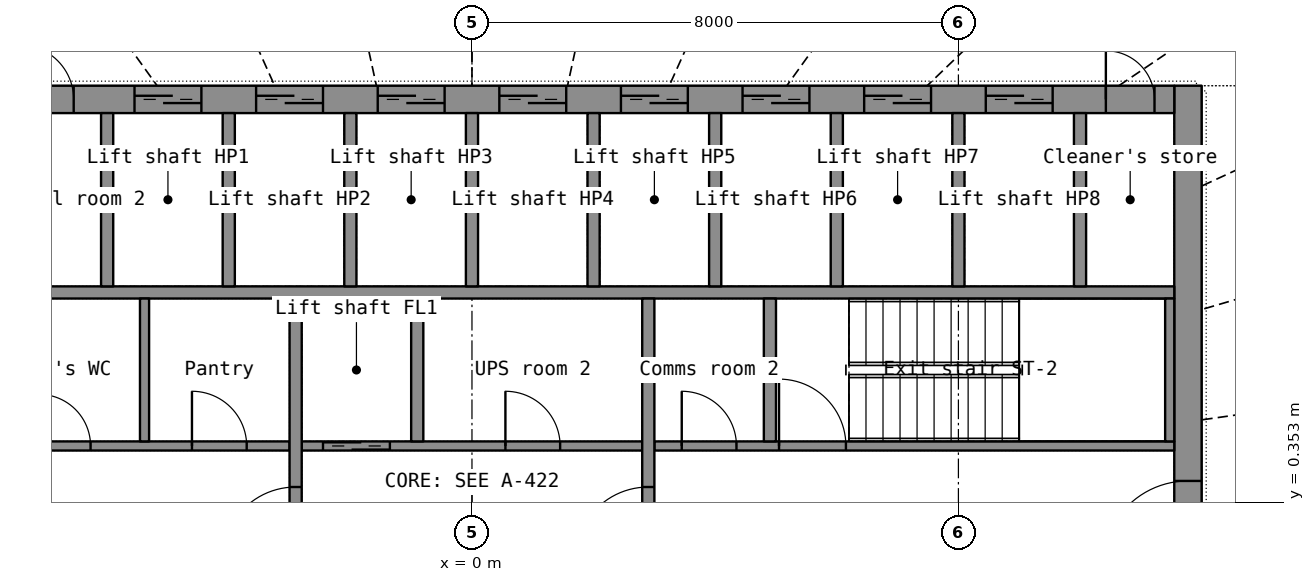
"""IFC4 building model, lengths in metres.
Left out: names, types, materials, properties, quantities, classifications, styles, units other than length and angle.
Written with IfcOpenShell. Run it as: python <this file> out.ifc"""

import sys

from ifc_helpers import new_model, si_unit, direction, frame, frame_2d, origin, place, context, subcontext, project, spatial, rectangle, extrude, element, fill, save


model = new_model("IFC4")
c1 = context("Model", 3, precision=1e-05, world=origin(), true_north=direction((0.0, 1.0)))
c2 = subcontext(c1, "Body", "Model", "MODEL_VIEW")
j1 = project(units=[si_unit("LENGTHUNIT", "METRE"), si_unit("PLANEANGLEUNIT", "RADIAN")], contexts=[c1])
p1 = place(None, origin())
s1 = spatial("IfcSite", under=j1, at=p1, CompositionType="ELEMENT")
p2 = place(p1, origin())
s2 = spatial("IfcBuilding", under=s1, at=p2, CompositionType="ELEMENT")
p3 = place(p2, frame((0.0, 0.0, 157.1)))
s3 = spatial("IfcBuildingStorey", under=s2, at=p3, CompositionType="ELEMENT", Elevation=157.1)
p4 = place(p3, frame((11.775, -7.2, 0.0), z_axis=(0.0, 0.0, 1.0), x_axis=(0.0, 1.0, 0.0)))
e1 = element("IfcWall", 1, at=p4, inside=s3, PredefinedType="SHEAR", context=c2, shape_type="SweptSolid", body=[
    extrude(rectangle(XDim=14.4, YDim=0.45, at=frame_2d((7.2, 0.0))), origin(), (0.0, 0.0, 1.0), 3.3),
])
p5 = place(p4, frame((6.5, 0.0, 0.0)))
e2 = element("IfcOpeningElement", 2, at=p5, cuts=e1, PredefinedType="OPENING", context=c2, shape_type="SweptSolid", body=[
    extrude(rectangle(XDim=1.4, YDim=2.2, at=frame_2d((0.7, 1.1))), frame((0.0, 0.235, 0.0), z_axis=(0.0, -1.0, 0.0), x_axis=(1.0, 0.0, 0.0)), (0.0, 0.0, 1.0), 0.47),
])
p6 = place(p3, frame((-11.55, 6.975, 0.0), z_axis=(0.0, 0.0, 1.0), x_axis=(1.0, 0.0, 0.0)))
e3 = element("IfcWall", 3, at=p6, inside=s3, PredefinedType="SHEAR", context=c2, shape_type="SweptSolid", body=[
    extrude(rectangle(XDim=23.1, YDim=0.45, at=frame_2d((11.55, 0.0))), origin(), (0.0, 0.0, 1.0), 3.3),
])
p7 = place(p6, frame((2.0, 0.0, 0.0)))
e4 = element("IfcOpeningElement", 4, at=p7, cuts=e3, PredefinedType="OPENING", context=c2, shape_type="SweptSolid", body=[
    extrude(rectangle(XDim=1.1, YDim=2.2, at=frame_2d((0.55, 1.1))), frame((0.0, 0.235, 0.0), z_axis=(0.0, -1.0, 0.0), x_axis=(1.0, 0.0, 0.0)), (0.0, 0.0, 1.0), 0.47),
])
p8 = place(p6, frame((6.0, 0.0, 0.0)))
e5 = element("IfcOpeningElement", 5, at=p8, cuts=e3, PredefinedType="OPENING", context=c2, shape_type="SweptSolid", body=[
    extrude(rectangle(XDim=1.1, YDim=2.2, at=frame_2d((0.55, 1.1))), frame((0.0, 0.235, 0.0), z_axis=(0.0, -1.0, 0.0), x_axis=(1.0, 0.0, 0.0)), (0.0, 0.0, 1.0), 0.47),
])
p9 = place(p6, frame((8.0, 0.0, 0.0)))
e6 = element("IfcOpeningElement", 6, at=p9, cuts=e3, PredefinedType="OPENING", context=c2, shape_type="SweptSolid", body=[
    extrude(rectangle(XDim=1.1, YDim=2.2, at=frame_2d((0.55, 1.1))), frame((0.0, 0.235, 0.0), z_axis=(0.0, -1.0, 0.0), x_axis=(1.0, 0.0, 0.0)), (0.0, 0.0, 1.0), 0.47),
])
p10 = place(p6, frame((10.0, 0.0, 0.0)))
e7 = element("IfcOpeningElement", 7, at=p10, cuts=e3, PredefinedType="OPENING", context=c2, shape_type="SweptSolid", body=[
    extrude(rectangle(XDim=1.1, YDim=2.2, at=frame_2d((0.55, 1.1))), frame((0.0, 0.235, 0.0), z_axis=(0.0, -1.0, 0.0), x_axis=(1.0, 0.0, 0.0)), (0.0, 0.0, 1.0), 0.47),
])
p11 = place(p6, frame((12.0, 0.0, 0.0)))
e8 = element("IfcOpeningElement", 8, at=p11, cuts=e3, PredefinedType="OPENING", context=c2, shape_type="SweptSolid", body=[
    extrude(rectangle(XDim=1.1, YDim=2.2, at=frame_2d((0.55, 1.1))), frame((0.0, 0.235, 0.0), z_axis=(0.0, -1.0, 0.0), x_axis=(1.0, 0.0, 0.0)), (0.0, 0.0, 1.0), 0.47),
])
p12 = place(p6, frame((14.0, 0.0, 0.0)))
e9 = element("IfcOpeningElement", 9, at=p12, cuts=e3, PredefinedType="OPENING", context=c2, shape_type="SweptSolid", body=[
    extrude(rectangle(XDim=1.1, YDim=2.2, at=frame_2d((0.55, 1.1))), frame((0.0, 0.235, 0.0), z_axis=(0.0, -1.0, 0.0), x_axis=(1.0, 0.0, 0.0)), (0.0, 0.0, 1.0), 0.47),
])
p13 = place(p6, frame((16.0, 0.0, 0.0)))
e10 = element("IfcOpeningElement", 10, at=p13, cuts=e3, PredefinedType="OPENING", context=c2, shape_type="SweptSolid", body=[
    extrude(rectangle(XDim=1.1, YDim=2.2, at=frame_2d((0.55, 1.1))), frame((0.0, 0.235, 0.0), z_axis=(0.0, -1.0, 0.0), x_axis=(1.0, 0.0, 0.0)), (0.0, 0.0, 1.0), 0.47),
])
p14 = place(p6, frame((18.0, 0.0, 0.0)))
e11 = element("IfcOpeningElement", 11, at=p14, cuts=e3, PredefinedType="OPENING", context=c2, shape_type="SweptSolid", body=[
    extrude(rectangle(XDim=1.1, YDim=2.2, at=frame_2d((0.55, 1.1))), frame((0.0, 0.235, 0.0), z_axis=(0.0, -1.0, 0.0), x_axis=(1.0, 0.0, 0.0)), (0.0, 0.0, 1.0), 0.47),
])
p15 = place(p6, frame((20.0, 0.0, 0.0)))
e12 = element("IfcOpeningElement", 12, at=p15, cuts=e3, PredefinedType="OPENING", context=c2, shape_type="SweptSolid", body=[
    extrude(rectangle(XDim=1.1, YDim=2.2, at=frame_2d((0.55, 1.1))), frame((0.0, 0.235, 0.0), z_axis=(0.0, -1.0, 0.0), x_axis=(1.0, 0.0, 0.0)), (0.0, 0.0, 1.0), 0.47),
])
p16 = place(p6, frame((4.1, 0.0, 0.0)))
e13 = element("IfcOpeningElement", 13, at=p16, cuts=e3, PredefinedType="OPENING", context=c2, shape_type="SweptSolid", body=[
    extrude(rectangle(XDim=0.9, YDim=2.1, at=frame_2d((0.45, 1.05))), frame((0.0, 0.235, 0.0), z_axis=(0.0, -1.0, 0.0), x_axis=(1.0, 0.0, 0.0)), (0.0, 0.0, 1.0), 0.47),
])
p17 = place(p6, frame((0.325, 0.0, 0.0)))
e14 = element("IfcOpeningElement", 14, at=p17, cuts=e3, PredefinedType="OPENING", context=c2, shape_type="SweptSolid", body=[
    extrude(rectangle(XDim=0.8, YDim=2.05, at=frame_2d((0.4, 1.025))), frame((0.0, 0.235, 0.0), z_axis=(0.0, -1.0, 0.0), x_axis=(1.0, 0.0, 0.0)), (0.0, 0.0, 1.0), 0.47),
])
p18 = place(p6, frame((21.975, 0.0, 0.0)))
e15 = element("IfcOpeningElement", 15, at=p18, cuts=e3, PredefinedType="OPENING", context=c2, shape_type="SweptSolid", body=[
    extrude(rectangle(XDim=0.8, YDim=2.05, at=frame_2d((0.4, 1.025))), frame((0.0, 0.235, 0.0), z_axis=(0.0, -1.0, 0.0), x_axis=(1.0, 0.0, 0.0)), (0.0, 0.0, 1.0), 0.47),
])
p19 = place(p3, frame((-11.55, 3.8, 0.0), z_axis=(0.0, 0.0, 1.0), x_axis=(1.0, 0.0, 0.0)))
e16 = element("IfcWall", 16, at=p19, inside=s3, PredefinedType="SHEAR", context=c2, shape_type="SweptSolid", body=[
    extrude(rectangle(XDim=23.1, YDim=0.2, at=frame_2d((11.55, 0.0))), origin(), (0.0, 0.0, 1.0), 3.3),
])
for number, where, z_axis, x_axis in (
    (17, (-6.0, 3.9, 0.0), (0.0, 0.0, 1.0), (0.0, 1.0, 0.0)),
    (18, (-4.0, 3.9, 0.0), (0.0, 0.0, 1.0), (0.0, 1.0, 0.0)),
    (19, (-2.0, 3.9, 0.0), (0.0, 0.0, 1.0), (0.0, 1.0, 0.0)),
    (20, (0.0, 3.9, 0.0), (0.0, 0.0, 1.0), (0.0, 1.0, 0.0)),
    (21, (2.0, 3.9, 0.0), (0.0, 0.0, 1.0), (0.0, 1.0, 0.0)),
    (22, (4.0, 3.9, 0.0), (0.0, 0.0, 1.0), (0.0, 1.0, 0.0)),
    (23, (6.0, 3.9, 0.0), (0.0, 0.0, 1.0), (0.0, 1.0, 0.0)),
    (24, (8.0, 3.9, 0.0), (0.0, 0.0, 1.0), (0.0, 1.0, 0.0)),
    (25, (10.0, 3.9, 0.0), (0.0, 0.0, 1.0), (0.0, 1.0, 0.0)),
):
    element("IfcWall", number, at=place(p3, frame(where, z_axis=z_axis, x_axis=x_axis)), inside=s3, PredefinedType="SHEAR", context=c2, shape_type="SweptSolid", body=[
        extrude(rectangle(XDim=2.85, YDim=0.2, at=frame_2d((1.425, 0.0))), origin(), (0.0, 0.0, 1.0), 3.3),
    ])
p20 = place(p3, frame((-11.55, 1.275, 0.0), z_axis=(0.0, 0.0, 1.0), x_axis=(1.0, 0.0, 0.0)))
e26 = element("IfcWall", 26, at=p20, inside=s3, PredefinedType="PARTITIONING", context=c2, shape_type="SweptSolid", body=[
    extrude(rectangle(XDim=8.55, YDim=0.15, at=frame_2d((4.275, 0.0))), origin(), (0.0, 0.0, 1.0), 3.3),
])
p21 = place(p20, frame((1.308, 0.0, 0.0)))
e27 = element("IfcOpeningElement", 27, at=p21, cuts=e26, PredefinedType="OPENING", context=c2, shape_type="SweptSolid", body=[
    extrude(rectangle(XDim=0.85, YDim=2.1, at=frame_2d((0.425, 1.05))), frame((0.0, 0.085, 0.0), z_axis=(0.0, -1.0, 0.0), x_axis=(1.0, 0.0, 0.0)), (0.0, 0.0, 1.0), 0.17),
])
p22 = place(p20, frame((4.427, 0.0, 0.0)))
e28 = element("IfcOpeningElement", 28, at=p22, cuts=e26, PredefinedType="OPENING", context=c2, shape_type="SweptSolid", body=[
    extrude(rectangle(XDim=0.85, YDim=2.1, at=frame_2d((0.425, 1.05))), frame((0.0, 0.085, 0.0), z_axis=(0.0, -1.0, 0.0), x_axis=(1.0, 0.0, 0.0)), (0.0, 0.0, 1.0), 0.17),
])
p23 = place(p20, frame((6.945, 0.0, 0.0)))
e29 = element("IfcOpeningElement", 29, at=p23, cuts=e26, PredefinedType="OPENING", context=c2, shape_type="SweptSolid", body=[
    extrude(rectangle(XDim=0.9, YDim=2.1, at=frame_2d((0.45, 1.05))), frame((0.0, 0.085, 0.0), z_axis=(0.0, -1.0, 0.0), x_axis=(1.0, 0.0, 0.0)), (0.0, 0.0, 1.0), 0.17),
])
p24 = place(p3, frame((-2.8, 1.275, 0.0), z_axis=(0.0, 0.0, 1.0), x_axis=(1.0, 0.0, 0.0)))
e30 = element("IfcWall", 30, at=p24, inside=s3, PredefinedType="SHEAR", context=c2, shape_type="SweptSolid", body=[
    extrude(rectangle(XDim=5.6, YDim=0.15, at=frame_2d((2.8, 0.0))), origin(), (0.0, 0.0, 1.0), 3.3),
])
p25 = place(p24, frame((0.35, 0.0, 0.0)))
e31 = element("IfcOpeningElement", 31, at=p25, cuts=e30, PredefinedType="OPENING", context=c2, shape_type="SweptSolid", body=[
    extrude(rectangle(XDim=1.1, YDim=2.2, at=frame_2d((0.55, 1.1))), frame((0.0, 0.085, 0.0), z_axis=(0.0, -1.0, 0.0), x_axis=(1.0, 0.0, 0.0)), (0.0, 0.0, 1.0), 0.17),
])
p26 = place(p24, frame((3.35, 0.0, 0.0)))
e32 = element("IfcOpeningElement", 32, at=p26, cuts=e30, PredefinedType="OPENING", context=c2, shape_type="SweptSolid", body=[
    extrude(rectangle(XDim=0.9, YDim=2.1, at=frame_2d((0.45, 1.05))), frame((0.0, 0.085, 0.0), z_axis=(0.0, -1.0, 0.0), x_axis=(1.0, 0.0, 0.0)), (0.0, 0.0, 1.0), 0.17),
])
p27 = place(p3, frame((3.0, 1.275, 0.0), z_axis=(0.0, 0.0, 1.0), x_axis=(1.0, 0.0, 0.0)))
e33 = element("IfcWall", 33, at=p27, inside=s3, PredefinedType="SHEAR", context=c2, shape_type="SweptSolid", body=[
    extrude(rectangle(XDim=8.55, YDim=0.15, at=frame_2d((4.275, 0.0))), origin(), (0.0, 0.0, 1.0), 3.3),
])
p28 = place(p27, frame((2.05, 0.0, 0.0)))
e34 = element("IfcOpeningElement", 34, at=p28, cuts=e33, PredefinedType="OPENING", context=c2, shape_type="SweptSolid", body=[
    extrude(rectangle(XDim=1.1, YDim=2.15, at=frame_2d((0.55, 1.075))), frame((0.0, 0.085, 0.0), z_axis=(0.0, -1.0, 0.0), x_axis=(1.0, 0.0, 0.0)), (0.0, 0.0, 1.0), 0.17),
])
p29 = place(p27, frame((0.45, 0.0, 0.0)))
e35 = element("IfcOpeningElement", 35, at=p29, cuts=e33, PredefinedType="OPENING", context=c2, shape_type="SweptSolid", body=[
    extrude(rectangle(XDim=0.9, YDim=2.1, at=frame_2d((0.45, 1.05))), frame((0.0, 0.085, 0.0), z_axis=(0.0, -1.0, 0.0), x_axis=(1.0, 0.0, 0.0)), (0.0, 0.0, 1.0), 0.17),
])
p30 = place(p3, frame((-2.9, -3.7, 0.0), z_axis=(0.0, 0.0, 1.0), x_axis=(0.0, 1.0, 0.0)))
e36 = element("IfcWall", 36, at=p30, inside=s3, PredefinedType="SHEAR", context=c2, shape_type="SweptSolid", body=[
    extrude(rectangle(XDim=7.4, YDim=0.2, at=frame_2d((3.7, 0.0))), origin(), (0.0, 0.0, 1.0), 3.3),
])
p31 = place(p30, frame((3.1, 0.0, 0.0)))
e37 = element("IfcOpeningElement", 37, at=p31, cuts=e36, PredefinedType="OPENING", context=c2, shape_type="SweptSolid", body=[
    extrude(rectangle(XDim=1.2, YDim=2.2, at=frame_2d((0.6, 1.1))), frame((0.0, 0.11, 0.0), z_axis=(0.0, -1.0, 0.0), x_axis=(1.0, 0.0, 0.0)), (0.0, 0.0, 1.0), 0.22),
])
p32 = place(p3, frame((2.9, -3.7, 0.0), z_axis=(0.0, 0.0, 1.0), x_axis=(0.0, 1.0, 0.0)))
e38 = element("IfcWall", 38, at=p32, inside=s3, PredefinedType="SHEAR", context=c2, shape_type="SweptSolid", body=[
    extrude(rectangle(XDim=7.4, YDim=0.2, at=frame_2d((3.7, 0.0))), origin(), (0.0, 0.0, 1.0), 3.3),
])
p33 = place(p32, frame((3.1, 0.0, 0.0)))
e39 = element("IfcOpeningElement", 39, at=p33, cuts=e38, PredefinedType="OPENING", context=c2, shape_type="SweptSolid", body=[
    extrude(rectangle(XDim=1.2, YDim=2.2, at=frame_2d((0.6, 1.1))), frame((0.0, 0.11, 0.0), z_axis=(0.0, -1.0, 0.0), x_axis=(1.0, 0.0, 0.0)), (0.0, 0.0, 1.0), 0.22),
])
p34 = place(p3, frame((-0.9, 1.35, 0.0), z_axis=(0.0, 0.0, 1.0), x_axis=(0.0, 1.0, 0.0)))
e40 = element("IfcWall", 40, at=p34, inside=s3, PredefinedType="SHEAR", context=c2, shape_type="SweptSolid", body=[
    extrude(rectangle(XDim=2.35, YDim=0.2, at=frame_2d((1.175, 0.0))), origin(), (0.0, 0.0, 1.0), 3.3),
])
p35 = place(p3, frame((11.475, 1.35, 0.0), z_axis=(0.0, 0.0, 1.0), x_axis=(0.0, 1.0, 0.0)))
e41 = element("IfcWall", 41, at=p35, inside=s3, PredefinedType="SHEAR", context=c2, shape_type="SweptSolid", body=[
    extrude(rectangle(XDim=2.35, YDim=0.15, at=frame_2d((1.175, 0.0))), origin(), (0.0, 0.0, 1.0), 3.3),
])
p36 = place(p3, frame((4.9, 1.35, 0.0), z_axis=(0.0, 0.0, 1.0), x_axis=(0.0, 1.0, 0.0)))
e42 = element("IfcWall", 42, at=p36, inside=s3, PredefinedType="SHEAR", context=c2, shape_type="SweptSolid", body=[
    extrude(rectangle(XDim=2.35, YDim=0.2, at=frame_2d((1.175, 0.0))), origin(), (0.0, 0.0, 1.0), 3.3),
])
p37 = place(p3, frame((-5.385, 1.35, 0.0), z_axis=(0.0, 0.0, 1.0), x_axis=(0.0, 1.0, 0.0)))
e43 = element("IfcWall", 43, at=p37, inside=s3, PredefinedType="PARTITIONING", context=c2, shape_type="SweptSolid", body=[
    extrude(rectangle(XDim=2.35, YDim=0.15, at=frame_2d((1.175, 0.0))), origin(), (0.0, 0.0, 1.0), 3.3),
])
p38 = place(p8, origin())
e44 = element("IfcDoor", 44, at=p38, inside=s3, OperationType="DOUBLE_DOOR_SLIDING", PredefinedType="DOOR", context=c2, shape_type="SweptSolid", body=[
    extrude(rectangle(XDim=1.1, YDim=2.2, at=frame_2d((0.55, 1.1))), frame((0.0, 0.025, 0.0), z_axis=(0.0, -1.0, 0.0), x_axis=(1.0, 0.0, 0.0)), (0.0, 0.0, 1.0), 0.05),
])
fill(e5, e44)
p39 = place(p9, origin())
e45 = element("IfcDoor", 45, at=p39, inside=s3, OperationType="DOUBLE_DOOR_SLIDING", PredefinedType="DOOR", context=c2, shape_type="SweptSolid", body=[
    extrude(rectangle(XDim=1.1, YDim=2.2, at=frame_2d((0.55, 1.1))), frame((0.0, 0.025, 0.0), z_axis=(0.0, -1.0, 0.0), x_axis=(1.0, 0.0, 0.0)), (0.0, 0.0, 1.0), 0.05),
])
fill(e6, e45)
p40 = place(p10, origin())
e46 = element("IfcDoor", 46, at=p40, inside=s3, OperationType="DOUBLE_DOOR_SLIDING", PredefinedType="DOOR", context=c2, shape_type="SweptSolid", body=[
    extrude(rectangle(XDim=1.1, YDim=2.2, at=frame_2d((0.55, 1.1))), frame((0.0, 0.025, 0.0), z_axis=(0.0, -1.0, 0.0), x_axis=(1.0, 0.0, 0.0)), (0.0, 0.0, 1.0), 0.05),
])
fill(e7, e46)
p41 = place(p11, origin())
e47 = element("IfcDoor", 47, at=p41, inside=s3, OperationType="DOUBLE_DOOR_SLIDING", PredefinedType="DOOR", context=c2, shape_type="SweptSolid", body=[
    extrude(rectangle(XDim=1.1, YDim=2.2, at=frame_2d((0.55, 1.1))), frame((0.0, 0.025, 0.0), z_axis=(0.0, -1.0, 0.0), x_axis=(1.0, 0.0, 0.0)), (0.0, 0.0, 1.0), 0.05),
])
fill(e8, e47)
p42 = place(p12, origin())
e48 = element("IfcDoor", 48, at=p42, inside=s3, OperationType="DOUBLE_DOOR_SLIDING", PredefinedType="DOOR", context=c2, shape_type="SweptSolid", body=[
    extrude(rectangle(XDim=1.1, YDim=2.2, at=frame_2d((0.55, 1.1))), frame((0.0, 0.025, 0.0), z_axis=(0.0, -1.0, 0.0), x_axis=(1.0, 0.0, 0.0)), (0.0, 0.0, 1.0), 0.05),
])
fill(e9, e48)
p43 = place(p13, origin())
e49 = element("IfcDoor", 49, at=p43, inside=s3, OperationType="DOUBLE_DOOR_SLIDING", PredefinedType="DOOR", context=c2, shape_type="SweptSolid", body=[
    extrude(rectangle(XDim=1.1, YDim=2.2, at=frame_2d((0.55, 1.1))), frame((0.0, 0.025, 0.0), z_axis=(0.0, -1.0, 0.0), x_axis=(1.0, 0.0, 0.0)), (0.0, 0.0, 1.0), 0.05),
])
fill(e10, e49)
p44 = place(p14, origin())
e50 = element("IfcDoor", 50, at=p44, inside=s3, OperationType="DOUBLE_DOOR_SLIDING", PredefinedType="DOOR", context=c2, shape_type="SweptSolid", body=[
    extrude(rectangle(XDim=1.1, YDim=2.2, at=frame_2d((0.55, 1.1))), frame((0.0, 0.025, 0.0), z_axis=(0.0, -1.0, 0.0), x_axis=(1.0, 0.0, 0.0)), (0.0, 0.0, 1.0), 0.05),
])
fill(e11, e50)
p45 = place(p15, origin())
e51 = element("IfcDoor", 51, at=p45, inside=s3, OperationType="DOUBLE_DOOR_SLIDING", PredefinedType="DOOR", context=c2, shape_type="SweptSolid", body=[
    extrude(rectangle(XDim=1.1, YDim=2.2, at=frame_2d((0.55, 1.1))), frame((0.0, 0.025, 0.0), z_axis=(0.0, -1.0, 0.0), x_axis=(1.0, 0.0, 0.0)), (0.0, 0.0, 1.0), 0.05),
])
fill(e12, e51)
p46 = place(p16, origin())
e52 = element("IfcDoor", 52, at=p46, inside=s3, OperationType="SINGLE_SWING_LEFT", PredefinedType="DOOR", context=c2, shape_type="SweptSolid", body=[
    extrude(rectangle(XDim=0.9, YDim=2.1, at=frame_2d((0.45, 1.05))), frame((0.0, 0.025, 0.0), z_axis=(0.0, -1.0, 0.0), x_axis=(1.0, 0.0, 0.0)), (0.0, 0.0, 1.0), 0.05),
])
fill(e13, e52)
p47 = place(p18, origin())
e53 = element("IfcDoor", 53, at=p47, inside=s3, OperationType="SINGLE_SWING_LEFT", PredefinedType="DOOR", context=c2, shape_type="SweptSolid", body=[
    extrude(rectangle(XDim=0.8, YDim=2.05, at=frame_2d((0.4, 1.025))), frame((0.0, 0.025, 0.0), z_axis=(0.0, -1.0, 0.0), x_axis=(1.0, 0.0, 0.0)), (0.0, 0.0, 1.0), 0.05),
])
fill(e15, e53)
p48 = place(p5, origin())
e54 = element("IfcDoor", 54, at=p48, inside=s3, OperationType="DOUBLE_DOOR_SINGLE_SWING", PredefinedType="DOOR", context=c2, shape_type="SweptSolid", body=[
    extrude(rectangle(XDim=1.4, YDim=2.2, at=frame_2d((0.7, 1.1))), frame((0.0, 0.025, 0.0), z_axis=(0.0, -1.0, 0.0), x_axis=(1.0, 0.0, 0.0)), (0.0, 0.0, 1.0), 0.05),
])
fill(e2, e54)
p49 = place(p31, origin())
e55 = element("IfcDoor", 55, at=p49, inside=s3, OperationType="SINGLE_SWING_LEFT", PredefinedType="DOOR", context=c2, shape_type="SweptSolid", body=[
    extrude(rectangle(XDim=1.2, YDim=2.2, at=frame_2d((0.6, 1.1))), frame((0.0, 0.025, 0.0), z_axis=(0.0, -1.0, 0.0), x_axis=(1.0, 0.0, 0.0)), (0.0, 0.0, 1.0), 0.05),
])
fill(e37, e55)
p50 = place(p33, origin())
e56 = element("IfcDoor", 56, at=p50, inside=s3, OperationType="SINGLE_SWING_LEFT", PredefinedType="DOOR", context=c2, shape_type="SweptSolid", body=[
    extrude(rectangle(XDim=1.2, YDim=2.2, at=frame_2d((0.6, 1.1))), frame((0.0, 0.025, 0.0), z_axis=(0.0, -1.0, 0.0), x_axis=(1.0, 0.0, 0.0)), (0.0, 0.0, 1.0), 0.05),
])
fill(e39, e56)
p51 = place(p25, origin())
e57 = element("IfcDoor", 57, at=p51, inside=s3, OperationType="DOUBLE_DOOR_SLIDING", PredefinedType="DOOR", context=c2, shape_type="SweptSolid", body=[
    extrude(rectangle(XDim=1.1, YDim=2.2, at=frame_2d((0.55, 1.1))), frame((0.0, 0.025, 0.0), z_axis=(0.0, -1.0, 0.0), x_axis=(1.0, 0.0, 0.0)), (0.0, 0.0, 1.0), 0.05),
])
fill(e31, e57)
p52 = place(p28, origin())
e58 = element("IfcDoor", 58, at=p52, inside=s3, OperationType="SINGLE_SWING_LEFT", PredefinedType="DOOR", context=c2, shape_type="SweptSolid", body=[
    extrude(rectangle(XDim=1.1, YDim=2.15, at=frame_2d((0.55, 1.075))), frame((0.0, 0.025, 0.0), z_axis=(0.0, -1.0, 0.0), x_axis=(1.0, 0.0, 0.0)), (0.0, 0.0, 1.0), 0.05),
])
fill(e34, e58)
p53 = place(p22, origin())
e59 = element("IfcDoor", 59, at=p53, inside=s3, OperationType="SINGLE_SWING_LEFT", PredefinedType="DOOR", context=c2, shape_type="SweptSolid", body=[
    extrude(rectangle(XDim=0.85, YDim=2.1, at=frame_2d((0.425, 1.05))), frame((0.0, 0.025, 0.0), z_axis=(0.0, -1.0, 0.0), x_axis=(1.0, 0.0, 0.0)), (0.0, 0.0, 1.0), 0.05),
])
fill(e28, e59)
p54 = place(p23, origin())
e60 = element("IfcDoor", 60, at=p54, inside=s3, OperationType="SINGLE_SWING_LEFT", PredefinedType="DOOR", context=c2, shape_type="SweptSolid", body=[
    extrude(rectangle(XDim=0.9, YDim=2.1, at=frame_2d((0.45, 1.05))), frame((0.0, 0.025, 0.0), z_axis=(0.0, -1.0, 0.0), x_axis=(1.0, 0.0, 0.0)), (0.0, 0.0, 1.0), 0.05),
])
fill(e29, e60)
p55 = place(p26, origin())
e61 = element("IfcDoor", 61, at=p55, inside=s3, OperationType="SINGLE_SWING_LEFT", PredefinedType="DOOR", context=c2, shape_type="SweptSolid", body=[
    extrude(rectangle(XDim=0.9, YDim=2.1, at=frame_2d((0.45, 1.05))), frame((0.0, 0.025, 0.0), z_axis=(0.0, -1.0, 0.0), x_axis=(1.0, 0.0, 0.0)), (0.0, 0.0, 1.0), 0.05),
])
fill(e32, e61)
p56 = place(p29, origin())
e62 = element("IfcDoor", 62, at=p56, inside=s3, OperationType="SINGLE_SWING_LEFT", PredefinedType="DOOR", context=c2, shape_type="SweptSolid", body=[
    extrude(rectangle(XDim=0.9, YDim=2.1, at=frame_2d((0.45, 1.05))), frame((0.0, 0.025, 0.0), z_axis=(0.0, -1.0, 0.0), x_axis=(1.0, 0.0, 0.0)), (0.0, 0.0, 1.0), 0.05),
])
fill(e35, e62)
save(model, sys.argv[1])
